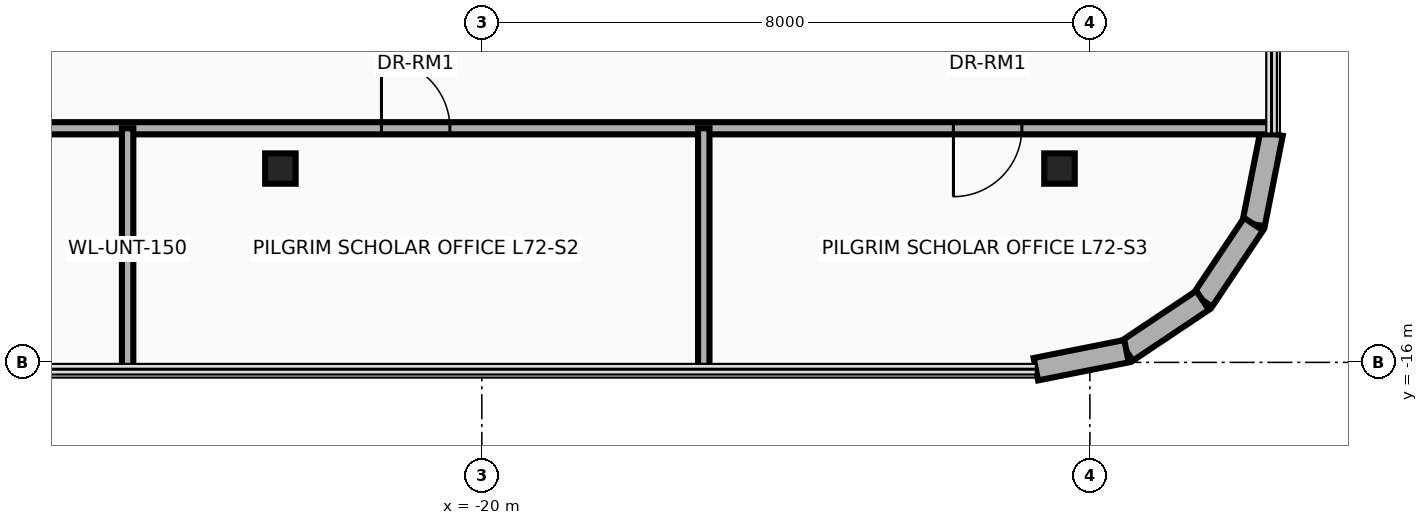
"""IFC4 building model, lengths in metres.
Left out: names, types, materials, properties, quantities, classifications, styles, units other than length and angle.
Written with IfcOpenShell. Run it as: python <this file> out.ifc"""

import sys

from ifc_helpers import new_model, si_unit, direction, frame, frame_2d, origin, origin_2d, place, context, subcontext, project, spatial, rectangle, i_section, extrude, source, transform, mapped, element, fill, save


model = new_model("IFC4")
c1 = context("Model", 3, precision=1e-05, world=origin(), true_north=direction((0.0, 1.0)))
c2 = subcontext(c1, "Body", "Model", "MODEL_VIEW")
j1 = project(units=[si_unit("LENGTHUNIT", "METRE"), si_unit("PLANEANGLEUNIT", "RADIAN")], contexts=[c1])
p1 = place(None, origin())
s1 = spatial("IfcSite", under=j1, at=p1, CompositionType="ELEMENT")
p2 = place(p1, origin())
s2 = spatial("IfcBuilding", under=s1, at=p2, CompositionType="ELEMENT")
p3 = place(p2, frame((0.0, 0.0, 276.5)))
s3 = spatial("IfcBuildingStorey", under=s2, at=p3, CompositionType="ELEMENT", Elevation=276.5)
m1 = source(origin(), c2, "Body", "SweptSolid", [
    extrude(i_section(OverallWidth=0.401, OverallDepth=0.399, WebThickness=0.025, FlangeThickness=0.04, at=origin_2d()), origin(), (0.0, 0.0, 1.0), 3.5),
])
for number, where, z_axis, x_axis in (
    (1, (-22.65, -13.45, 0.0), (0.0, 0.0, 1.0), (1.0, 0.0, 0.0)),
    (2, (-12.4, -13.45, 0.0), (0.0, 0.0, 1.0), (1.0, 0.0, 0.0)),
):
    element("IfcColumn", number, at=place(p3, frame(where, z_axis=z_axis, x_axis=x_axis)), inside=s3, PredefinedType="COLUMN", context=c2, shape_type="MappedRepresentation", body=[
        mapped(m1, transform((0.0, 0.0, 0.0), x_axis=(1.0, 0.0, 0.0), y_axis=(0.0, 1.0, 0.0), z_axis=(0.0, 0.0, 1.0), scale=1.0)),
    ])
p4 = place(p3, frame((-9.61, -12.989, 0.0), z_axis=(0.0, 0.0, 1.0), x_axis=(-0.194996050505, -0.980804027463, 0.0)))
e3 = element("IfcWall", 3, at=p4, inside=s3, PredefinedType="SOLIDWALL", context=c2, shape_type="SweptSolid", body=[
    extrude(rectangle(XDim=1.216, YDim=0.3, at=frame_2d((0.608, 0.0))), origin(), (0.0, 0.0, 1.0), 3.26),
])
for number, where, z_axis, x_axis in (
    (4, (-9.847, -14.182, 0.0), (0.0, 0.0, 1.0), (-0.556, -0.831, 0.0)),
    (5, (-10.517, -15.183, 0.0), (0.0, 0.0, 1.0), (-0.831, -0.556, 0.0)),
):
    element("IfcWall", number, at=place(p3, frame(where, z_axis=z_axis, x_axis=x_axis)), inside=s3, PredefinedType="SOLIDWALL", context=c2, shape_type="SweptSolid", body=[
        extrude(rectangle(XDim=1.205, YDim=0.3, at=frame_2d((0.603, 0.0))), origin(), (0.0, 0.0, 1.0), 3.26),
    ])
p5 = place(p3, frame((-11.518, -15.853, 0.0), z_axis=(0.0, 0.0, 1.0), x_axis=(-0.980765602568, -0.195189223115, 0.0)))
e6 = element("IfcWall", 6, at=p5, inside=s3, PredefinedType="SOLIDWALL", context=c2, shape_type="SweptSolid", body=[
    extrude(rectangle(XDim=1.216, YDim=0.3, at=frame_2d((0.608, 0.0))), origin(), (0.0, 0.0, 1.0), 3.26),
])
p6 = place(p3, frame((-30.39, -12.92, 0.0), z_axis=(0.0, 0.0, 1.0), x_axis=(1.0, 0.0, 0.0)))
e7 = element("IfcWall", 7, at=p6, inside=s3, PredefinedType="PARTITIONING", context=c2, shape_type="SweptSolid", body=[
    extrude(rectangle(XDim=20.78, YDim=0.16, at=frame_2d((10.39, 0.0))), origin(), (0.0, 0.0, 1.0), 2.634),
])
p7 = place(p6, frame((2.415, 0.0, 0.0)))
e8 = element("IfcOpeningElement", 8, at=p7, cuts=e7, PredefinedType="OPENING", context=c2, shape_type="SweptSolid", body=[
    extrude(rectangle(XDim=0.9, YDim=2.1, at=frame_2d((0.45, 1.05))), frame((0.0, 0.095, 0.0), z_axis=(0.0, -1.0, 0.0), x_axis=(1.0, 0.0, 0.0)), (0.0, 0.0, 1.0), 0.19),
])
p8 = place(p6, frame((9.07, 0.0, 0.0)))
e9 = element("IfcOpeningElement", 9, at=p8, cuts=e7, PredefinedType="OPENING", context=c2, shape_type="SweptSolid", body=[
    extrude(rectangle(XDim=0.9, YDim=2.1, at=frame_2d((0.45, 1.05))), frame((0.0, 0.095, 0.0), z_axis=(0.0, -1.0, 0.0), x_axis=(1.0, 0.0, 0.0)), (0.0, 0.0, 1.0), 0.19),
])
p9 = place(p6, frame((16.595, 0.0, 0.0)))
e10 = element("IfcOpeningElement", 10, at=p9, cuts=e7, PredefinedType="OPENING", context=c2, shape_type="SweptSolid", body=[
    extrude(rectangle(XDim=0.9, YDim=2.1, at=frame_2d((0.45, 1.05))), frame((0.0, 0.095, 0.0), z_axis=(0.0, -1.0, 0.0), x_axis=(1.0, 0.0, 0.0)), (0.0, 0.0, 1.0), 0.19),
])
p10 = place(p3, frame((-24.66, -16.09, 0.0), z_axis=(0.0, 0.0, 1.0), x_axis=(0.0, 1.0, 0.0)))
e11 = element("IfcWall", 11, at=p10, inside=s3, PredefinedType="PARTITIONING", context=c2, shape_type="SweptSolid", body=[
    extrude(rectangle(XDim=3.17, YDim=0.15, at=frame_2d((1.585, 0.0))), origin(), (0.0, 0.0, 1.0), 3.26),
])
p11 = place(p3, frame((-17.08, -16.09, 0.0), z_axis=(0.0, 0.0, 1.0), x_axis=(0.0, 1.0, 0.0)))
e12 = element("IfcWall", 12, at=p11, inside=s3, PredefinedType="PARTITIONING", context=c2, shape_type="SweptSolid", body=[
    extrude(rectangle(XDim=3.17, YDim=0.15, at=frame_2d((1.585, 0.0))), origin(), (0.0, 0.0, 1.0), 2.706),
])
p12 = place(p8, origin())
e13 = element("IfcDoor", 13, at=p12, inside=s3, OperationType="SINGLE_SWING_RIGHT", PredefinedType="DOOR", context=c2, shape_type="SweptSolid", body=[
    extrude(rectangle(XDim=0.9, YDim=2.1, at=frame_2d((0.45, 1.05))), frame((0.0, 0.025, 0.0), z_axis=(0.0, -1.0, 0.0), x_axis=(1.0, 0.0, 0.0)), (0.0, 0.0, 1.0), 0.05),
])
fill(e9, e13)
p13 = place(p9, frame((0.9, 0.0, 0.0), z_axis=(0.0, 0.0, 1.0), x_axis=(-1.0, 0.0, 0.0)))
e14 = element("IfcDoor", 14, at=p13, inside=s3, OperationType="SINGLE_SWING_LEFT", PredefinedType="DOOR", context=c2, shape_type="SweptSolid", body=[
    extrude(rectangle(XDim=0.9, YDim=2.1, at=frame_2d((0.45, 1.05))), frame((0.0, 0.025, 0.0), z_axis=(0.0, -1.0, 0.0), x_axis=(1.0, 0.0, 0.0)), (0.0, 0.0, 1.0), 0.05),
])
fill(e10, e14)
save(model, sys.argv[1])
